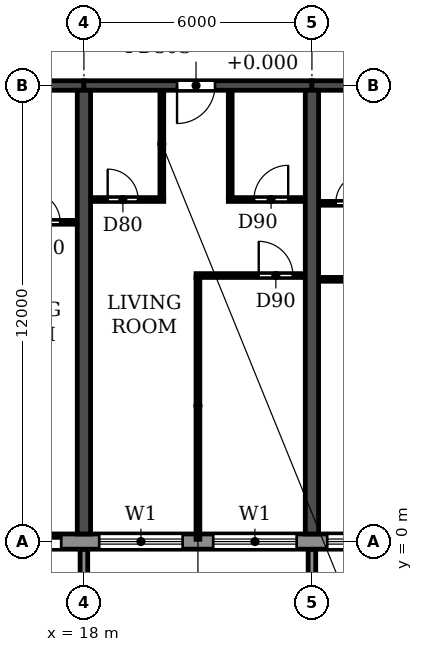
"""IFC4 building model, lengths in metres.
Left out: names, types, materials, properties, quantities, classifications, styles, units other than length and angle.
Written with IfcOpenShell. Run it as: python <this file> out.ifc"""

import sys

from ifc_helpers import new_model, si_unit, direction, frame, frame_2d, origin, place, context, subcontext, project, spatial, polyline, rectangle, outline, extrude, source, transform, mapped, element, fill, save


model = new_model("IFC4")
c1 = context("Model", 3, precision=1e-05, world=origin(), true_north=direction((0.0, 1.0)))
c2 = subcontext(c1, "Body", "Model", "MODEL_VIEW")
j1 = project(units=[si_unit("LENGTHUNIT", "METRE"), si_unit("PLANEANGLEUNIT", "RADIAN")], contexts=[c1])
p1 = place(None, origin())
s1 = spatial("IfcSite", under=j1, at=p1, CompositionType="ELEMENT")
p2 = place(p1, origin())
s2 = spatial("IfcBuilding", under=s1, at=p2, CompositionType="ELEMENT")
p3 = place(p2, frame((0.0, 0.0, 76.2)))
s3 = spatial("IfcBuildingStorey", under=s2, at=p3, CompositionType="ELEMENT", Elevation=76.2)
for number, where, z_axis, x_axis in (
    (1, (18.0, 0.2, 0.0), (0.0, 0.0, 1.0), (0.0, 1.0, 0.0)),
    (2, (24.0, 0.2, 0.0), (0.0, 0.0, 1.0), (0.0, 1.0, 0.0)),
):
    element("IfcWall", number, at=place(p3, frame(where, z_axis=z_axis, x_axis=x_axis)), inside=s3, PredefinedType="SHEAR", context=c2, shape_type="SweptSolid", body=[
        extrude(rectangle(XDim=11.675, YDim=0.35, at=frame_2d((5.837, 0.0))), origin(), (0.0, 0.0, 1.0), 3.06),
    ])
p4 = place(p3, frame((12.0, 12.0, 0.0), z_axis=(0.0, 0.0, 1.0), x_axis=(1.0, 0.0, 0.0)))
e3 = element("IfcWall", 3, at=p4, inside=s3, PredefinedType="SHEAR", context=c2, shape_type="SweptSolid", body=[
    extrude(rectangle(XDim=6.0, YDim=0.25, at=frame_2d((3.0, 0.0))), origin(), (0.0, 0.0, 1.0), 2.46),
])
p5 = place(p4, frame((2.55, 0.0, 0.0)))
e4 = element("IfcOpeningElement", 4, at=p5, cuts=e3, PredefinedType="OPENING", context=c2, shape_type="SweptSolid", body=[
    extrude(rectangle(XDim=1.0, YDim=2.1, at=frame_2d((0.5, 1.05))), frame((0.0, 0.135, 0.0), z_axis=(0.0, -1.0, 0.0), x_axis=(1.0, 0.0, 0.0)), (0.0, 0.0, 1.0), 0.27),
])
p6 = place(p3, frame((18.0, 12.0, 0.0), z_axis=(0.0, 0.0, 1.0), x_axis=(1.0, 0.0, 0.0)))
e5 = element("IfcWall", 5, at=p6, inside=s3, PredefinedType="SHEAR", context=c2, shape_type="SweptSolid", body=[
    extrude(rectangle(XDim=6.0, YDim=0.25, at=frame_2d((3.0, 0.0))), origin(), (0.0, 0.0, 1.0), 2.46),
])
p7 = place(p6, frame((2.45, 0.0, 0.0)))
e6 = element("IfcOpeningElement", 6, at=p7, cuts=e5, PredefinedType="OPENING", context=c2, shape_type="SweptSolid", body=[
    extrude(rectangle(XDim=1.0, YDim=2.1, at=frame_2d((0.5, 1.05))), frame((0.0, 0.135, 0.0), z_axis=(0.0, -1.0, 0.0), x_axis=(1.0, 0.0, 0.0)), (0.0, 0.0, 1.0), 0.27),
])
p8 = place(p3, frame((24.0, 12.0, 0.0), z_axis=(0.0, 0.0, 1.0), x_axis=(1.0, 0.0, 0.0)))
e7 = element("IfcWall", 7, at=p8, inside=s3, PredefinedType="SHEAR", context=c2, shape_type="SweptSolid", body=[
    extrude(rectangle(XDim=6.0, YDim=0.25, at=frame_2d((3.0, 0.0))), origin(), (0.0, 0.0, 1.0), 2.46),
])
p9 = place(p8, frame((2.45, 0.0, 0.0)))
e8 = element("IfcOpeningElement", 8, at=p9, cuts=e7, PredefinedType="OPENING", context=c2, shape_type="SweptSolid", body=[
    extrude(rectangle(XDim=1.0, YDim=2.1, at=frame_2d((0.5, 1.05))), frame((0.0, 0.135, 0.0), z_axis=(0.0, -1.0, 0.0), x_axis=(1.0, 0.0, 0.0)), (0.0, 0.0, 1.0), 0.27),
])
p10 = place(p3, frame((10.683, 0.0, 0.0), z_axis=(0.0, 0.0, 1.0), x_axis=(1.0, 0.0, 0.0)))
e9 = element("IfcWall", 9, at=p10, inside=s3, PredefinedType="STANDARD", context=c2, shape_type="SweptSolid", body=[
    extrude(rectangle(XDim=80.634, YDim=0.4, at=frame_2d((40.317, 0.0))), origin(), (0.0, 0.0, 1.0), 3.06),
])
p11 = place(p10, frame((1.717, 0.0, 0.9)))
e10 = element("IfcOpeningElement", 10, at=p11, cuts=e9, PredefinedType="OPENING", context=c2, shape_type="SweptSolid", body=[
    extrude(rectangle(XDim=2.2, YDim=1.5, at=frame_2d((1.1, 0.75))), frame((0.0, 0.21, 0.0), z_axis=(0.0, -1.0, 0.0), x_axis=(1.0, 0.0, 0.0)), (0.0, 0.0, 1.0), 0.42),
])
p12 = place(p10, frame((4.917, 0.0, 0.0)))
e11 = element("IfcOpeningElement", 11, at=p12, cuts=e9, PredefinedType="OPENING", context=c2, shape_type="SweptSolid", body=[
    extrude(rectangle(XDim=1.8, YDim=2.4, at=frame_2d((0.9, 1.2))), frame((0.0, 0.21, 0.0), z_axis=(0.0, -1.0, 0.0), x_axis=(1.0, 0.0, 0.0)), (0.0, 0.0, 1.0), 0.42),
])
p13 = place(p10, frame((7.717, 0.0, 0.9)))
e12 = element("IfcOpeningElement", 12, at=p13, cuts=e9, PredefinedType="OPENING", context=c2, shape_type="SweptSolid", body=[
    extrude(rectangle(XDim=2.2, YDim=1.5, at=frame_2d((1.1, 0.75))), frame((0.0, 0.21, 0.0), z_axis=(0.0, -1.0, 0.0), x_axis=(1.0, 0.0, 0.0)), (0.0, 0.0, 1.0), 0.42),
])
p14 = place(p10, frame((10.717, 0.0, 0.9)))
e13 = element("IfcOpeningElement", 13, at=p14, cuts=e9, PredefinedType="OPENING", context=c2, shape_type="SweptSolid", body=[
    extrude(rectangle(XDim=2.2, YDim=1.5, at=frame_2d((1.1, 0.75))), frame((0.0, 0.21, 0.0), z_axis=(0.0, -1.0, 0.0), x_axis=(1.0, 0.0, 0.0)), (0.0, 0.0, 1.0), 0.42),
])
p15 = place(p10, frame((13.717, 0.0, 0.9)))
e14 = element("IfcOpeningElement", 14, at=p15, cuts=e9, PredefinedType="OPENING", context=c2, shape_type="SweptSolid", body=[
    extrude(rectangle(XDim=2.2, YDim=1.5, at=frame_2d((1.1, 0.75))), frame((0.0, 0.21, 0.0), z_axis=(0.0, -1.0, 0.0), x_axis=(1.0, 0.0, 0.0)), (0.0, 0.0, 1.0), 0.42),
])
p16 = place(p10, frame((16.917, 0.0, 0.0)))
e15 = element("IfcOpeningElement", 15, at=p16, cuts=e9, PredefinedType="OPENING", context=c2, shape_type="SweptSolid", body=[
    extrude(rectangle(XDim=1.8, YDim=2.4, at=frame_2d((0.9, 1.2))), frame((0.0, 0.21, 0.0), z_axis=(0.0, -1.0, 0.0), x_axis=(1.0, 0.0, 0.0)), (0.0, 0.0, 1.0), 0.42),
])
p17 = place(p10, frame((19.717, 0.0, 0.9)))
e16 = element("IfcOpeningElement", 16, at=p17, cuts=e9, PredefinedType="OPENING", context=c2, shape_type="SweptSolid", body=[
    extrude(rectangle(XDim=2.2, YDim=1.5, at=frame_2d((1.1, 0.75))), frame((0.0, 0.21, 0.0), z_axis=(0.0, -1.0, 0.0), x_axis=(1.0, 0.0, 0.0)), (0.0, 0.0, 1.0), 0.42),
])
p18 = place(p10, frame((22.717, 0.0, 0.9)))
e17 = element("IfcOpeningElement", 17, at=p18, cuts=e9, PredefinedType="OPENING", context=c2, shape_type="SweptSolid", body=[
    extrude(rectangle(XDim=2.2, YDim=1.5, at=frame_2d((1.1, 0.75))), frame((0.0, 0.21, 0.0), z_axis=(0.0, -1.0, 0.0), x_axis=(1.0, 0.0, 0.0)), (0.0, 0.0, 1.0), 0.42),
])
p19 = place(p10, frame((25.917, 0.0, 0.0)))
e18 = element("IfcOpeningElement", 18, at=p19, cuts=e9, PredefinedType="OPENING", context=c2, shape_type="SweptSolid", body=[
    extrude(rectangle(XDim=1.8, YDim=2.4, at=frame_2d((0.9, 1.2))), frame((0.0, 0.21, 0.0), z_axis=(0.0, -1.0, 0.0), x_axis=(1.0, 0.0, 0.0)), (0.0, 0.0, 1.0), 0.42),
])
p20 = place(p10, frame((28.717, 0.0, 0.9)))
e19 = element("IfcOpeningElement", 19, at=p20, cuts=e9, PredefinedType="OPENING", context=c2, shape_type="SweptSolid", body=[
    extrude(rectangle(XDim=2.2, YDim=1.5, at=frame_2d((1.1, 0.75))), frame((0.0, 0.21, 0.0), z_axis=(0.0, -1.0, 0.0), x_axis=(1.0, 0.0, 0.0)), (0.0, 0.0, 1.0), 0.42),
])
p21 = place(p10, frame((31.717, 0.0, 0.9)))
e20 = element("IfcOpeningElement", 20, at=p21, cuts=e9, PredefinedType="OPENING", context=c2, shape_type="SweptSolid", body=[
    extrude(rectangle(XDim=2.2, YDim=1.5, at=frame_2d((1.1, 0.75))), frame((0.0, 0.21, 0.0), z_axis=(0.0, -1.0, 0.0), x_axis=(1.0, 0.0, 0.0)), (0.0, 0.0, 1.0), 0.42),
])
p22 = place(p10, frame((34.717, 0.0, 0.9)))
e21 = element("IfcOpeningElement", 21, at=p22, cuts=e9, PredefinedType="OPENING", context=c2, shape_type="SweptSolid", body=[
    extrude(rectangle(XDim=2.2, YDim=1.5, at=frame_2d((1.1, 0.75))), frame((0.0, 0.21, 0.0), z_axis=(0.0, -1.0, 0.0), x_axis=(1.0, 0.0, 0.0)), (0.0, 0.0, 1.0), 0.42),
])
p23 = place(p10, frame((37.917, 0.0, 0.0)))
e22 = element("IfcOpeningElement", 22, at=p23, cuts=e9, PredefinedType="OPENING", context=c2, shape_type="SweptSolid", body=[
    extrude(rectangle(XDim=1.8, YDim=2.4, at=frame_2d((0.9, 1.2))), frame((0.0, 0.21, 0.0), z_axis=(0.0, -1.0, 0.0), x_axis=(1.0, 0.0, 0.0)), (0.0, 0.0, 1.0), 0.42),
])
p24 = place(p10, frame((40.717, 0.0, 0.9)))
e23 = element("IfcOpeningElement", 23, at=p24, cuts=e9, PredefinedType="OPENING", context=c2, shape_type="SweptSolid", body=[
    extrude(rectangle(XDim=2.2, YDim=1.5, at=frame_2d((1.1, 0.75))), frame((0.0, 0.21, 0.0), z_axis=(0.0, -1.0, 0.0), x_axis=(1.0, 0.0, 0.0)), (0.0, 0.0, 1.0), 0.42),
])
p25 = place(p10, frame((43.717, 0.0, 0.9)))
e24 = element("IfcOpeningElement", 24, at=p25, cuts=e9, PredefinedType="OPENING", context=c2, shape_type="SweptSolid", body=[
    extrude(rectangle(XDim=2.2, YDim=1.5, at=frame_2d((1.1, 0.75))), frame((0.0, 0.21, 0.0), z_axis=(0.0, -1.0, 0.0), x_axis=(1.0, 0.0, 0.0)), (0.0, 0.0, 1.0), 0.42),
])
p26 = place(p10, frame((46.717, 0.0, 0.9)))
e25 = element("IfcOpeningElement", 25, at=p26, cuts=e9, PredefinedType="OPENING", context=c2, shape_type="SweptSolid", body=[
    extrude(rectangle(XDim=2.2, YDim=1.5, at=frame_2d((1.1, 0.75))), frame((0.0, 0.21, 0.0), z_axis=(0.0, -1.0, 0.0), x_axis=(1.0, 0.0, 0.0)), (0.0, 0.0, 1.0), 0.42),
])
p27 = place(p10, frame((49.917, 0.0, 0.0)))
e26 = element("IfcOpeningElement", 26, at=p27, cuts=e9, PredefinedType="OPENING", context=c2, shape_type="SweptSolid", body=[
    extrude(rectangle(XDim=1.8, YDim=2.4, at=frame_2d((0.9, 1.2))), frame((0.0, 0.21, 0.0), z_axis=(0.0, -1.0, 0.0), x_axis=(1.0, 0.0, 0.0)), (0.0, 0.0, 1.0), 0.42),
])
p28 = place(p10, frame((52.717, 0.0, 0.9)))
e27 = element("IfcOpeningElement", 27, at=p28, cuts=e9, PredefinedType="OPENING", context=c2, shape_type="SweptSolid", body=[
    extrude(rectangle(XDim=2.2, YDim=1.5, at=frame_2d((1.1, 0.75))), frame((0.0, 0.21, 0.0), z_axis=(0.0, -1.0, 0.0), x_axis=(1.0, 0.0, 0.0)), (0.0, 0.0, 1.0), 0.42),
])
p29 = place(p10, frame((55.717, 0.0, 0.9)))
e28 = element("IfcOpeningElement", 28, at=p29, cuts=e9, PredefinedType="OPENING", context=c2, shape_type="SweptSolid", body=[
    extrude(rectangle(XDim=2.2, YDim=1.5, at=frame_2d((1.1, 0.75))), frame((0.0, 0.21, 0.0), z_axis=(0.0, -1.0, 0.0), x_axis=(1.0, 0.0, 0.0)), (0.0, 0.0, 1.0), 0.42),
])
p30 = place(p10, frame((58.717, 0.0, 0.9)))
e29 = element("IfcOpeningElement", 29, at=p30, cuts=e9, PredefinedType="OPENING", context=c2, shape_type="SweptSolid", body=[
    extrude(rectangle(XDim=2.2, YDim=1.5, at=frame_2d((1.1, 0.75))), frame((0.0, 0.21, 0.0), z_axis=(0.0, -1.0, 0.0), x_axis=(1.0, 0.0, 0.0)), (0.0, 0.0, 1.0), 0.42),
])
p31 = place(p10, frame((61.717, 0.0, 0.9)))
e30 = element("IfcOpeningElement", 30, at=p31, cuts=e9, PredefinedType="OPENING", context=c2, shape_type="SweptSolid", body=[
    extrude(rectangle(XDim=2.2, YDim=1.5, at=frame_2d((1.1, 0.75))), frame((0.0, 0.21, 0.0), z_axis=(0.0, -1.0, 0.0), x_axis=(1.0, 0.0, 0.0)), (0.0, 0.0, 1.0), 0.42),
])
p32 = place(p10, frame((64.917, 0.0, 0.0)))
e31 = element("IfcOpeningElement", 31, at=p32, cuts=e9, PredefinedType="OPENING", context=c2, shape_type="SweptSolid", body=[
    extrude(rectangle(XDim=1.8, YDim=2.4, at=frame_2d((0.9, 1.2))), frame((0.0, 0.21, 0.0), z_axis=(0.0, -1.0, 0.0), x_axis=(1.0, 0.0, 0.0)), (0.0, 0.0, 1.0), 0.42),
])
p33 = place(p10, frame((67.717, 0.0, 0.9)))
e32 = element("IfcOpeningElement", 32, at=p33, cuts=e9, PredefinedType="OPENING", context=c2, shape_type="SweptSolid", body=[
    extrude(rectangle(XDim=2.2, YDim=1.5, at=frame_2d((1.1, 0.75))), frame((0.0, 0.21, 0.0), z_axis=(0.0, -1.0, 0.0), x_axis=(1.0, 0.0, 0.0)), (0.0, 0.0, 1.0), 0.42),
])
p34 = place(p10, frame((70.717, 0.0, 0.9)))
e33 = element("IfcOpeningElement", 33, at=p34, cuts=e9, PredefinedType="OPENING", context=c2, shape_type="SweptSolid", body=[
    extrude(rectangle(XDim=2.2, YDim=1.5, at=frame_2d((1.1, 0.75))), frame((0.0, 0.21, 0.0), z_axis=(0.0, -1.0, 0.0), x_axis=(1.0, 0.0, 0.0)), (0.0, 0.0, 1.0), 0.42),
])
p35 = place(p10, frame((73.917, 0.0, 0.0)))
e34 = element("IfcOpeningElement", 34, at=p35, cuts=e9, PredefinedType="OPENING", context=c2, shape_type="SweptSolid", body=[
    extrude(rectangle(XDim=1.8, YDim=2.4, at=frame_2d((0.9, 1.2))), frame((0.0, 0.21, 0.0), z_axis=(0.0, -1.0, 0.0), x_axis=(1.0, 0.0, 0.0)), (0.0, 0.0, 1.0), 0.42),
])
p36 = place(p10, frame((76.717, 0.0, 0.9)))
e35 = element("IfcOpeningElement", 35, at=p36, cuts=e9, PredefinedType="OPENING", context=c2, shape_type="SweptSolid", body=[
    extrude(rectangle(XDim=2.2, YDim=1.5, at=frame_2d((1.1, 0.75))), frame((0.0, 0.21, 0.0), z_axis=(0.0, -1.0, 0.0), x_axis=(1.0, 0.0, 0.0)), (0.0, 0.0, 1.0), 0.42),
])
m1 = source(origin(), c2, "Body", "SweptSolid", [
    extrude(outline(polyline([(0.0, 0.0), (0.2, 0.0), (0.2, 1.65), (0.0, 1.65), (0.0, 0.0)])), origin(), (0.0, 0.0, 1.0), 3.1),
])
for number, where in (
    (36, (17.9, -1.85, 0.0)),
    (37, (23.9, -1.85, 0.0)),
):
    element("IfcWall", number, at=place(p3, frame(where)), inside=s3, PredefinedType="STANDARD", context=c2, shape_type="MappedRepresentation", body=[
        mapped(m1, transform((0.0, 0.0, 0.0))),
    ])
p37 = place(p3, frame((24.185, 6.9, 0.0), z_axis=(0.0, 0.0, 1.0), x_axis=(1.0, 0.0, 0.0)))
e38 = element("IfcWall", 38, at=p37, inside=s3, PredefinedType="PARTITIONING", context=c2, shape_type="SweptSolid", body=[
    extrude(rectangle(XDim=2.865, YDim=0.1, at=frame_2d((1.433, 0.0))), origin(), (0.0, 0.0, 1.0), 3.06),
])
p38 = place(p37, frame((1.415, 0.0, 0.0)))
e39 = element("IfcOpeningElement", 39, at=p38, cuts=e38, PredefinedType="OPENING", context=c2, shape_type="SweptSolid", body=[
    extrude(rectangle(XDim=0.9, YDim=2.1, at=frame_2d((0.45, 1.05))), frame((0.0, 0.06, 0.0), z_axis=(0.0, -1.0, 0.0), x_axis=(1.0, 0.0, 0.0)), (0.0, 0.0, 1.0), 0.12),
])
p39 = place(p3, frame((20.95, 7.0, 0.0), z_axis=(0.0, 0.0, 1.0), x_axis=(1.0, 0.0, 0.0)))
e40 = element("IfcWall", 40, at=p39, inside=s3, PredefinedType="PARTITIONING", context=c2, shape_type="SweptSolid", body=[
    extrude(rectangle(XDim=2.865, YDim=0.1, at=frame_2d((1.433, 0.0))), origin(), (0.0, 0.0, 1.0), 3.06),
])
p40 = place(p39, frame((1.65, 0.0, 0.0)))
e41 = element("IfcOpeningElement", 41, at=p40, cuts=e40, PredefinedType="OPENING", context=c2, shape_type="SweptSolid", body=[
    extrude(rectangle(XDim=0.9, YDim=2.1, at=frame_2d((0.45, 1.05))), frame((0.0, 0.06, 0.0), z_axis=(0.0, -1.0, 0.0), x_axis=(1.0, 0.0, 0.0)), (0.0, 0.0, 1.0), 0.12),
])
p41 = place(p3, frame((15.9, 8.4, 0.0), z_axis=(0.0, 0.0, 1.0), x_axis=(1.0, 0.0, 0.0)))
e42 = element("IfcWall", 42, at=p41, inside=s3, PredefinedType="PARTITIONING", context=c2, shape_type="SweptSolid", body=[
    extrude(rectangle(XDim=1.915, YDim=0.1, at=frame_2d((0.958, 0.0))), origin(), (0.0, 0.0, 1.0), 3.06),
])
p42 = place(p41, frame((0.675, 0.0, 0.0)))
e43 = element("IfcOpeningElement", 43, at=p42, cuts=e42, PredefinedType="OPENING", context=c2, shape_type="SweptSolid", body=[
    extrude(rectangle(XDim=0.8, YDim=2.1, at=frame_2d((0.4, 1.05))), frame((0.0, 0.06, 0.0), z_axis=(0.0, -1.0, 0.0), x_axis=(1.0, 0.0, 0.0)), (0.0, 0.0, 1.0), 0.12),
])
p43 = place(p3, frame((24.185, 8.9, 0.0), z_axis=(0.0, 0.0, 1.0), x_axis=(1.0, 0.0, 0.0)))
e44 = element("IfcWall", 44, at=p43, inside=s3, PredefinedType="PARTITIONING", context=c2, shape_type="SweptSolid", body=[
    extrude(rectangle(XDim=1.915, YDim=0.1, at=frame_2d((0.958, 0.0))), origin(), (0.0, 0.0, 1.0), 3.06),
])
p44 = place(p43, frame((0.44, 0.0, 0.0)))
e45 = element("IfcOpeningElement", 45, at=p44, cuts=e44, PredefinedType="OPENING", context=c2, shape_type="SweptSolid", body=[
    extrude(rectangle(XDim=0.8, YDim=2.1, at=frame_2d((0.4, 1.05))), frame((0.0, 0.06, 0.0), z_axis=(0.0, -1.0, 0.0), x_axis=(1.0, 0.0, 0.0)), (0.0, 0.0, 1.0), 0.12),
])
p45 = place(p3, frame((18.185, 9.0, 0.0), z_axis=(0.0, 0.0, 1.0), x_axis=(1.0, 0.0, 0.0)))
e46 = element("IfcWall", 46, at=p45, inside=s3, PredefinedType="PARTITIONING", context=c2, shape_type="SweptSolid", body=[
    extrude(rectangle(XDim=1.915, YDim=0.1, at=frame_2d((0.958, 0.0))), origin(), (0.0, 0.0, 1.0), 3.06),
])
p46 = place(p45, frame((0.44, 0.0, 0.0)))
e47 = element("IfcOpeningElement", 47, at=p46, cuts=e46, PredefinedType="OPENING", context=c2, shape_type="SweptSolid", body=[
    extrude(rectangle(XDim=0.8, YDim=2.1, at=frame_2d((0.4, 1.05))), frame((0.0, 0.06, 0.0), z_axis=(0.0, -1.0, 0.0), x_axis=(1.0, 0.0, 0.0)), (0.0, 0.0, 1.0), 0.12),
])
p47 = place(p3, frame((21.8, 9.0, 0.0), z_axis=(0.0, 0.0, 1.0), x_axis=(1.0, 0.0, 0.0)))
e48 = element("IfcWall", 48, at=p47, inside=s3, PredefinedType="PARTITIONING", context=c2, shape_type="SweptSolid", body=[
    extrude(rectangle(XDim=2.015, YDim=0.1, at=frame_2d((1.007, 0.0))), origin(), (0.0, 0.0, 1.0), 3.06),
])
p48 = place(p47, frame((0.675, 0.0, 0.0)))
e49 = element("IfcOpeningElement", 49, at=p48, cuts=e48, PredefinedType="OPENING", context=c2, shape_type="SweptSolid", body=[
    extrude(rectangle(XDim=0.9, YDim=2.1, at=frame_2d((0.45, 1.05))), frame((0.0, 0.06, 0.0), z_axis=(0.0, -1.0, 0.0), x_axis=(1.0, 0.0, 0.0)), (0.0, 0.0, 1.0), 0.12),
])
p49 = place(p3, frame((20.05, 9.05, 0.0), z_axis=(0.0, 0.0, 1.0), x_axis=(0.0, 1.0, 0.0)))
e50 = element("IfcWall", 50, at=p49, inside=s3, PredefinedType="PARTITIONING", context=c2, shape_type="SweptSolid", body=[
    extrude(rectangle(XDim=2.815, YDim=0.1, at=frame_2d((1.407, 0.0))), origin(), (0.0, 0.0, 1.0), 3.06),
])
p50 = place(p3, frame((21.0, 0.06, 0.0), z_axis=(0.0, 0.0, 1.0), x_axis=(0.0, 1.0, 0.0)))
e51 = element("IfcWall", 51, at=p50, inside=s3, PredefinedType="PARTITIONING", context=c2, shape_type="SweptSolid", body=[
    extrude(rectangle(XDim=6.89, YDim=0.1, at=frame_2d((3.445, 0.0))), origin(), (0.0, 0.0, 1.0), 3.06),
])
p51 = place(p3, frame((21.85, 9.05, 0.0), z_axis=(0.0, 0.0, 1.0), x_axis=(0.0, 1.0, 0.0)))
e52 = element("IfcWall", 52, at=p51, inside=s3, PredefinedType="PARTITIONING", context=c2, shape_type="SweptSolid", body=[
    extrude(rectangle(XDim=2.815, YDim=0.1, at=frame_2d((1.407, 0.0))), origin(), (0.0, 0.0, 1.0), 3.06),
])
p52 = place(p12, origin())
e53 = element("IfcDoor", 53, at=p52, inside=s3, OperationType="DOUBLE_DOOR_SLIDING", PredefinedType="DOOR", context=c2, shape_type="SweptSolid", body=[
    extrude(rectangle(XDim=1.8, YDim=2.4, at=frame_2d((0.9, 1.2))), frame((0.0, 0.025, 0.0), z_axis=(0.0, -1.0, 0.0), x_axis=(1.0, 0.0, 0.0)), (0.0, 0.0, 1.0), 0.05),
])
fill(e11, e53)
p53 = place(p13, origin())
e54 = element("IfcWindow", 54, at=p53, inside=s3, PartitioningType="DOUBLE_PANEL_HORIZONTAL", PredefinedType="WINDOW", context=c2, shape_type="SweptSolid", body=[
    extrude(rectangle(XDim=2.2, YDim=1.5, at=frame_2d((1.1, 0.75))), frame((0.0, 0.03, 0.0), z_axis=(0.0, -1.0, 0.0), x_axis=(1.0, 0.0, 0.0)), (0.0, 0.0, 1.0), 0.06),
])
fill(e12, e54)
p54 = place(p14, origin())
e55 = element("IfcWindow", 55, at=p54, inside=s3, PartitioningType="DOUBLE_PANEL_HORIZONTAL", PredefinedType="WINDOW", context=c2, shape_type="SweptSolid", body=[
    extrude(rectangle(XDim=2.2, YDim=1.5, at=frame_2d((1.1, 0.75))), frame((0.0, 0.03, 0.0), z_axis=(0.0, -1.0, 0.0), x_axis=(1.0, 0.0, 0.0)), (0.0, 0.0, 1.0), 0.06),
])
fill(e13, e55)
p55 = place(p15, origin())
e56 = element("IfcWindow", 56, at=p55, inside=s3, PartitioningType="DOUBLE_PANEL_HORIZONTAL", PredefinedType="WINDOW", context=c2, shape_type="SweptSolid", body=[
    extrude(rectangle(XDim=2.2, YDim=1.5, at=frame_2d((1.1, 0.75))), frame((0.0, 0.03, 0.0), z_axis=(0.0, -1.0, 0.0), x_axis=(1.0, 0.0, 0.0)), (0.0, 0.0, 1.0), 0.06),
])
fill(e14, e56)
p56 = place(p42, origin())
e57 = element("IfcDoor", 57, at=p56, inside=s3, OperationType="SINGLE_SWING_LEFT", PredefinedType="DOOR", context=c2, shape_type="SweptSolid", body=[
    extrude(rectangle(XDim=0.8, YDim=2.1, at=frame_2d((0.4, 1.05))), frame((0.0, 0.025, 0.0), z_axis=(0.0, -1.0, 0.0), x_axis=(1.0, 0.0, 0.0)), (0.0, 0.0, 1.0), 0.05),
])
fill(e43, e57)
p57 = place(p46, origin())
e58 = element("IfcDoor", 58, at=p57, inside=s3, OperationType="SINGLE_SWING_LEFT", PredefinedType="DOOR", context=c2, shape_type="SweptSolid", body=[
    extrude(rectangle(XDim=0.8, YDim=2.1, at=frame_2d((0.4, 1.05))), frame((0.0, 0.025, 0.0), z_axis=(0.0, -1.0, 0.0), x_axis=(1.0, 0.0, 0.0)), (0.0, 0.0, 1.0), 0.05),
])
fill(e47, e58)
p58 = place(p7, frame((1.0, 0.0, 0.0), z_axis=(0.0, 0.0, 1.0), x_axis=(-1.0, 0.0, 0.0)))
e59 = element("IfcDoor", 59, at=p58, inside=s3, OperationType="SINGLE_SWING_RIGHT", PredefinedType="DOOR", context=c2, shape_type="SweptSolid", body=[
    extrude(rectangle(XDim=1.0, YDim=2.1, at=frame_2d((0.5, 1.05))), frame((0.0, 0.025, 0.0), z_axis=(0.0, -1.0, 0.0), x_axis=(1.0, 0.0, 0.0)), (0.0, 0.0, 1.0), 0.05),
])
fill(e6, e59)
p59 = place(p48, origin())
e60 = element("IfcDoor", 60, at=p59, inside=s3, OperationType="SINGLE_SWING_RIGHT", PredefinedType="DOOR", context=c2, shape_type="SweptSolid", body=[
    extrude(rectangle(XDim=0.9, YDim=2.1, at=frame_2d((0.45, 1.05))), frame((0.0, 0.025, 0.0), z_axis=(0.0, -1.0, 0.0), x_axis=(1.0, 0.0, 0.0)), (0.0, 0.0, 1.0), 0.05),
])
fill(e49, e60)
p60 = place(p40, origin())
e61 = element("IfcDoor", 61, at=p60, inside=s3, OperationType="SINGLE_SWING_LEFT", PredefinedType="DOOR", context=c2, shape_type="SweptSolid", body=[
    extrude(rectangle(XDim=0.9, YDim=2.1, at=frame_2d((0.45, 1.05))), frame((0.0, 0.025, 0.0), z_axis=(0.0, -1.0, 0.0), x_axis=(1.0, 0.0, 0.0)), (0.0, 0.0, 1.0), 0.05),
])
fill(e41, e61)
p61 = place(p44, origin())
e62 = element("IfcDoor", 62, at=p61, inside=s3, OperationType="SINGLE_SWING_RIGHT", PredefinedType="DOOR", context=c2, shape_type="SweptSolid", body=[
    extrude(rectangle(XDim=0.8, YDim=2.1, at=frame_2d((0.4, 1.05))), frame((0.0, 0.025, 0.0), z_axis=(0.0, -1.0, 0.0), x_axis=(1.0, 0.0, 0.0)), (0.0, 0.0, 1.0), 0.05),
])
fill(e45, e62)
save(model, sys.argv[1])
